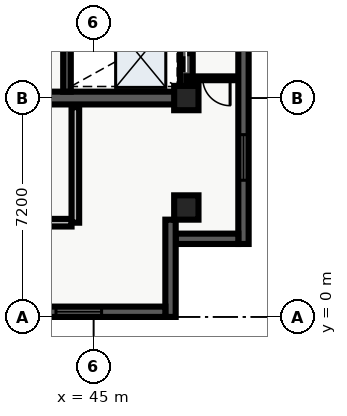
"""IFC4 building model, lengths in metres.
Left out: names, types, materials, properties, quantities, classifications, styles, units other than length and angle.
Written with IfcOpenShell. Run it as: python <this file> out.ifc"""

import sys

from ifc_helpers import new_model, entity, si_unit, converted_unit, direction, frame, origin_with_axes, origin_2d_with_axis, place, context, subcontext, project, spatial, polyline, rectangle, outline, extrude, element, fill, save


model = new_model("IFC4")
c1 = context("Model", 3, precision=1e-05, world=origin_with_axes(), true_north=direction((0.0, 1.0)))
c2 = subcontext(c1, "Body", "Model", "MODEL_VIEW")
j1 = project(units=[si_unit("LENGTHUNIT", "METRE"), converted_unit("PLANEANGLEUNIT", "DEGREE", entity("IfcPlaneAngleMeasure", 0.017), si_unit("PLANEANGLEUNIT", "RADIAN"), dimensions=[0, 0, 0, 0, 0, 0, 0])], contexts=[c1])
p1 = place(None, origin_with_axes())
s1 = spatial("IfcSite", under=j1, at=p1, CompositionType="ELEMENT")
p2 = place(p1, origin_with_axes())
s2 = spatial("IfcBuilding", under=s1, at=p2, CompositionType="ELEMENT")
p3 = place(p2, frame((0.0, 0.0, 272.4), z_axis=(0.0, 0.0, 1.0), x_axis=(1.0, 0.0, 0.0)))
s3 = spatial("IfcBuildingStorey", under=s2, at=p3, CompositionType="ELEMENT", Elevation=272.4)
p4 = place(p3, frame((40.2, 7.2, 0.0), z_axis=(0.0, 0.0, 1.0), x_axis=(1.0, 0.0, 0.0)))
e1 = element("IfcWall", 1, at=p4, inside=s3, PredefinedType="SHEAR", context=c2, shape_type="SweptSolid", body=[
    extrude(outline(polyline([(0.0, -0.21), (7.85, -0.21), (7.85, 0.21), (0.0, 0.21), (0.0, -0.21)])), origin_with_axes(), (0.0, 0.0, 1.0), 3.66),
])
p5 = place(p4, frame((2.175, 0.0, 0.0), z_axis=(0.0, 0.0, 1.0), x_axis=(1.0, 0.0, 0.0)))
e2 = element("IfcOpeningElement", 2, at=p5, cuts=e1, PredefinedType="OPENING", context=c2, shape_type="SweptSolid", body=[
    extrude(rectangle(XDim=1.05, YDim=0.44, at=origin_2d_with_axis()), origin_with_axes(), (0.0, 0.0, 1.0), 2.15),
])
p6 = place(p3, frame((48.05, 7.2, 0.0), z_axis=(0.0, 0.0, 1.0), x_axis=(0.0, 1.0, 0.0)))
e3 = element("IfcWall", 3, at=p6, inside=s3, PredefinedType="SHEAR", context=c2, shape_type="SweptSolid", body=[
    extrude(outline(polyline([(0.0, -0.21), (15.6, -0.21), (15.6, 0.21), (0.0, 0.21), (0.0, -0.21)])), origin_with_axes(), (0.0, 0.0, 1.0), 3.66),
])
p7 = place(p6, frame((1.375, 0.0, 0.0), z_axis=(0.0, 0.0, 1.0), x_axis=(1.0, 0.0, 0.0)))
e4 = element("IfcOpeningElement", 4, at=p7, cuts=e3, PredefinedType="OPENING", context=c2, shape_type="SweptSolid", body=[
    extrude(rectangle(XDim=1.05, YDim=0.44, at=origin_2d_with_axis()), origin_with_axes(), (0.0, 0.0, 1.0), 2.15),
])
p8 = place(p6, frame((5.125, 0.0, 0.0), z_axis=(0.0, 0.0, 1.0), x_axis=(1.0, 0.0, 0.0)))
e5 = element("IfcOpeningElement", 5, at=p8, cuts=e3, PredefinedType="OPENING", context=c2, shape_type="SweptSolid", body=[
    extrude(rectangle(XDim=0.95, YDim=0.44, at=origin_2d_with_axis()), origin_with_axes(), (0.0, 0.0, 1.0), 2.15),
])
p9 = place(p3, frame((44.125, 7.41, 0.0), z_axis=(0.0, 0.0, 1.0), x_axis=(0.0, 1.0, 0.0)))
e6 = element("IfcWall", 6, at=p9, inside=s3, PredefinedType="SHEAR", context=c2, shape_type="SweptSolid", body=[
    extrude(outline(polyline([(0.0, -0.125), (15.18, -0.125), (15.18, 0.125), (0.0, 0.125), (0.0, -0.125)])), origin_with_axes(), (0.0, 0.0, 1.0), 3.66),
])
p10 = place(p3, frame((40.325, 3.1, 0.0), z_axis=(0.0, 0.0, 1.0), x_axis=(1.0, 0.0, 0.0)))
e7 = element("IfcWall", 7, at=p10, inside=s3, PredefinedType="SOLIDWALL", context=c2, shape_type="SweptSolid", body=[
    extrude(outline(polyline([(0.0, -0.125), (3.95, -0.125), (3.95, 0.125), (0.0, 0.125), (0.0, -0.125)])), origin_with_axes(), (0.0, 0.0, 1.0), 2.7),
])
p11 = place(p3, frame((44.4, 3.1, 0.0), z_axis=(0.0, 0.0, 1.0), x_axis=(0.0, 1.0, 0.0)))
e8 = element("IfcWall", 8, at=p11, inside=s3, PredefinedType="SOLIDWALL", context=c2, shape_type="SweptSolid", body=[
    extrude(outline(polyline([(0.0, -0.125), (3.8, -0.125), (3.8, 0.125), (0.0, 0.125), (0.0, -0.125)])), origin_with_axes(), (0.0, 0.0, 1.0), 2.7),
])
for number, where, z_axis, x_axis in (
    (9, (48.05, 3.6, 0.0), (0.0, 0.0, 1.0), (1.0, 0.0, 0.0)),
    (10, (48.05, 7.2, 0.0), (0.0, 0.0, 1.0), (1.0, 0.0, 0.0)),
):
    element("IfcColumn", number, at=place(p3, frame(where, z_axis=z_axis, x_axis=x_axis)), inside=s3, PredefinedType="COLUMN", context=c2, shape_type="SweptSolid", body=[
        extrude(rectangle(XDim=0.8, YDim=0.8, at=origin_2d_with_axis()), origin_with_axes(), (0.0, 0.0, 1.0), 3.9),
    ])
p12 = place(p3, frame((49.765, 7.85, 0.0), z_axis=(0.0, 0.0, 1.0), x_axis=(-1.0, 0.0, 0.0)))
e11 = element("IfcWall", 11, at=p12, inside=s3, PredefinedType="PARTITIONING", context=c2, shape_type="SweptSolid", body=[
    extrude(outline(polyline([(0.0, -0.062), (1.715, -0.062), (1.715, 0.062), (0.0, 0.062), (0.0, -0.062)])), origin_with_axes(), (0.0, 0.0, 1.0), 2.7),
])
p13 = place(p12, frame((0.725, 0.0, 0.0), z_axis=(0.0, 0.0, 1.0), x_axis=(1.0, 0.0, 0.0)))
e12 = element("IfcOpeningElement", 12, at=p13, cuts=e11, PredefinedType="OPENING", context=c2, shape_type="SweptSolid", body=[
    extrude(rectangle(XDim=0.9, YDim=0.145, at=origin_2d_with_axis()), origin_with_axes(), (0.0, 0.0, 1.0), 2.15),
])
p14 = place(p3, frame((49.93, 26.06, 0.0), z_axis=(0.0, 0.0, 1.0), x_axis=(0.0, -1.0, 0.0)))
e13 = element("IfcWall", 13, at=p14, inside=s3, PredefinedType="SOLIDWALL", context=c2, shape_type="SweptSolid", body=[
    extrude(outline(polyline([(0.0, -0.17), (23.66, -0.17), (23.66, 0.17), (0.0, 0.17), (0.0, -0.17)])), origin_with_axes(), (0.0, 0.0, 1.0), 3.66),
])
p15 = place(p14, frame((2.846, 0.0, 0.45), z_axis=(0.0, 0.0, 1.0), x_axis=(1.0, 0.0, 0.0)))
e14 = element("IfcOpeningElement", 14, at=p15, cuts=e13, PredefinedType="OPENING", context=c2, shape_type="SweptSolid", body=[
    extrude(rectangle(XDim=1.5, YDim=0.36, at=origin_2d_with_axis()), origin_with_axes(), (0.0, 0.0, 1.0), 2.1),
])
p16 = place(p14, frame((7.338, 0.0, 0.45), z_axis=(0.0, 0.0, 1.0), x_axis=(1.0, 0.0, 0.0)))
e15 = element("IfcOpeningElement", 15, at=p16, cuts=e13, PredefinedType="OPENING", context=c2, shape_type="SweptSolid", body=[
    extrude(rectangle(XDim=1.5, YDim=0.36, at=origin_2d_with_axis()), origin_with_axes(), (0.0, 0.0, 1.0), 2.1),
])
p17 = place(p14, frame((11.83, 0.0, 0.45), z_axis=(0.0, 0.0, 1.0), x_axis=(1.0, 0.0, 0.0)))
e16 = element("IfcOpeningElement", 16, at=p17, cuts=e13, PredefinedType="OPENING", context=c2, shape_type="SweptSolid", body=[
    extrude(rectangle(XDim=1.5, YDim=0.36, at=origin_2d_with_axis()), origin_with_axes(), (0.0, 0.0, 1.0), 2.1),
])
p18 = place(p14, frame((16.322, 0.0, 0.45), z_axis=(0.0, 0.0, 1.0), x_axis=(1.0, 0.0, 0.0)))
e17 = element("IfcOpeningElement", 17, at=p18, cuts=e13, PredefinedType="OPENING", context=c2, shape_type="SweptSolid", body=[
    extrude(rectangle(XDim=1.5, YDim=0.36, at=origin_2d_with_axis()), origin_with_axes(), (0.0, 0.0, 1.0), 2.1),
])
p19 = place(p14, frame((20.814, 0.0, 0.45), z_axis=(0.0, 0.0, 1.0), x_axis=(1.0, 0.0, 0.0)))
e18 = element("IfcOpeningElement", 18, at=p19, cuts=e13, PredefinedType="OPENING", context=c2, shape_type="SweptSolid", body=[
    extrude(rectangle(XDim=1.5, YDim=0.36, at=origin_2d_with_axis()), origin_with_axes(), (0.0, 0.0, 1.0), 2.1),
])
p20 = place(p3, frame((49.76, 2.57, 0.0), z_axis=(0.0, 0.0, 1.0), x_axis=(-1.0, 0.0, 0.0)))
e19 = element("IfcWall", 19, at=p20, inside=s3, PredefinedType="SOLIDWALL", context=c2, shape_type="SweptSolid", body=[
    extrude(outline(polyline([(0.0, -0.17), (2.06, -0.17), (2.06, 0.17), (0.0, 0.17), (0.0, -0.17)])), origin_with_axes(), (0.0, 0.0, 1.0), 3.66),
])
p21 = place(p3, frame((47.53, 3.2, 0.0), z_axis=(0.0, 0.0, 1.0), x_axis=(0.0, -1.0, 0.0)))
e20 = element("IfcWall", 20, at=p21, inside=s3, PredefinedType="SOLIDWALL", context=c2, shape_type="SweptSolid", body=[
    extrude(outline(polyline([(0.0, -0.17), (3.2, -0.17), (3.2, 0.17), (0.0, 0.17), (0.0, -0.17)])), origin_with_axes(), (0.0, 0.0, 1.0), 3.66),
])
p22 = place(p3, frame((47.36, 0.17, 0.0), z_axis=(0.0, 0.0, 1.0), x_axis=(-1.0, 0.0, 0.0)))
e21 = element("IfcWall", 21, at=p22, inside=s3, PredefinedType="SOLIDWALL", context=c2, shape_type="SweptSolid", body=[
    extrude(outline(polyline([(0.0, -0.17), (37.16, -0.17), (37.16, 0.17), (0.0, 0.17), (0.0, -0.17)])), origin_with_axes(), (0.0, 0.0, 1.0), 3.66),
])
p23 = place(p22, frame((2.847, 0.0, 0.45), z_axis=(0.0, 0.0, 1.0), x_axis=(1.0, 0.0, 0.0)))
e22 = element("IfcOpeningElement", 22, at=p23, cuts=e21, PredefinedType="OPENING", context=c2, shape_type="SweptSolid", body=[
    extrude(rectangle(XDim=1.5, YDim=0.36, at=origin_2d_with_axis()), origin_with_axes(), (0.0, 0.0, 1.0), 2.1),
])
p24 = place(p22, frame((7.342, 0.0, 0.45), z_axis=(0.0, 0.0, 1.0), x_axis=(1.0, 0.0, 0.0)))
e23 = element("IfcOpeningElement", 23, at=p24, cuts=e21, PredefinedType="OPENING", context=c2, shape_type="SweptSolid", body=[
    extrude(rectangle(XDim=1.5, YDim=0.36, at=origin_2d_with_axis()), origin_with_axes(), (0.0, 0.0, 1.0), 2.1),
])
p25 = place(p22, frame((11.837, 0.0, 0.45), z_axis=(0.0, 0.0, 1.0), x_axis=(1.0, 0.0, 0.0)))
e24 = element("IfcOpeningElement", 24, at=p25, cuts=e21, PredefinedType="OPENING", context=c2, shape_type="SweptSolid", body=[
    extrude(rectangle(XDim=1.5, YDim=0.36, at=origin_2d_with_axis()), origin_with_axes(), (0.0, 0.0, 1.0), 2.1),
])
p26 = place(p22, frame((16.332, 0.0, 0.45), z_axis=(0.0, 0.0, 1.0), x_axis=(1.0, 0.0, 0.0)))
e25 = element("IfcOpeningElement", 25, at=p26, cuts=e21, PredefinedType="OPENING", context=c2, shape_type="SweptSolid", body=[
    extrude(rectangle(XDim=1.5, YDim=0.36, at=origin_2d_with_axis()), origin_with_axes(), (0.0, 0.0, 1.0), 2.1),
])
p27 = place(p22, frame((20.827, 0.0, 0.45), z_axis=(0.0, 0.0, 1.0), x_axis=(1.0, 0.0, 0.0)))
e26 = element("IfcOpeningElement", 26, at=p27, cuts=e21, PredefinedType="OPENING", context=c2, shape_type="SweptSolid", body=[
    extrude(rectangle(XDim=1.5, YDim=0.36, at=origin_2d_with_axis()), origin_with_axes(), (0.0, 0.0, 1.0), 2.1),
])
p28 = place(p22, frame((25.322, 0.0, 0.45), z_axis=(0.0, 0.0, 1.0), x_axis=(1.0, 0.0, 0.0)))
e27 = element("IfcOpeningElement", 27, at=p28, cuts=e21, PredefinedType="OPENING", context=c2, shape_type="SweptSolid", body=[
    extrude(rectangle(XDim=1.5, YDim=0.36, at=origin_2d_with_axis()), origin_with_axes(), (0.0, 0.0, 1.0), 2.1),
])
p29 = place(p22, frame((29.817, 0.0, 0.45), z_axis=(0.0, 0.0, 1.0), x_axis=(1.0, 0.0, 0.0)))
e28 = element("IfcOpeningElement", 28, at=p29, cuts=e21, PredefinedType="OPENING", context=c2, shape_type="SweptSolid", body=[
    extrude(rectangle(XDim=1.5, YDim=0.36, at=origin_2d_with_axis()), origin_with_axes(), (0.0, 0.0, 1.0), 2.1),
])
p30 = place(p22, frame((34.312, 0.0, 0.45), z_axis=(0.0, 0.0, 1.0), x_axis=(1.0, 0.0, 0.0)))
e29 = element("IfcOpeningElement", 29, at=p30, cuts=e21, PredefinedType="OPENING", context=c2, shape_type="SweptSolid", body=[
    extrude(rectangle(XDim=1.5, YDim=0.36, at=origin_2d_with_axis()), origin_with_axes(), (0.0, 0.0, 1.0), 2.1),
])
p31 = place(p6, frame((1.375, 0.0, 0.0), z_axis=(0.0, 0.0, 1.0), x_axis=(1.0, 0.0, 0.0)))
e30 = element("IfcDoor", 30, at=p31, inside=s3, OperationType="SLIDING_TO_LEFT", PredefinedType="DOOR", context=c2, shape_type="SweptSolid", body=[
    extrude(rectangle(XDim=1.05, YDim=0.09, at=origin_2d_with_axis()), origin_with_axes(), (0.0, 0.0, 1.0), 2.15),
])
fill(e4, e30)
p32 = place(p12, frame((0.725, 0.0, 0.0), z_axis=(0.0, 0.0, 1.0), x_axis=(1.0, 0.0, 0.0)))
e31 = element("IfcDoor", 31, at=p32, inside=s3, OperationType="SINGLE_SWING_LEFT", PredefinedType="DOOR", context=c2, shape_type="SweptSolid", body=[
    extrude(rectangle(XDim=0.9, YDim=0.075, at=origin_2d_with_axis()), origin_with_axes(), (0.0, 0.0, 1.0), 2.15),
])
fill(e12, e31)
p33 = place(p14, frame((20.814, 0.0, 0.45), z_axis=(0.0, 0.0, 1.0), x_axis=(1.0, 0.0, 0.0)))
e32 = element("IfcWindow", 32, at=p33, inside=s3, PredefinedType="WINDOW", context=c2, shape_type="SweptSolid", body=[
    extrude(rectangle(XDim=1.5, YDim=0.09, at=origin_2d_with_axis()), origin_with_axes(), (0.0, 0.0, 1.0), 2.1),
])
fill(e18, e32)
p34 = place(p22, frame((2.847, 0.0, 0.45), z_axis=(0.0, 0.0, 1.0), x_axis=(1.0, 0.0, 0.0)))
e33 = element("IfcWindow", 33, at=p34, inside=s3, PredefinedType="WINDOW", context=c2, shape_type="SweptSolid", body=[
    extrude(rectangle(XDim=1.5, YDim=0.09, at=origin_2d_with_axis()), origin_with_axes(), (0.0, 0.0, 1.0), 2.1),
])
fill(e22, e33)
save(model, sys.argv[1])
